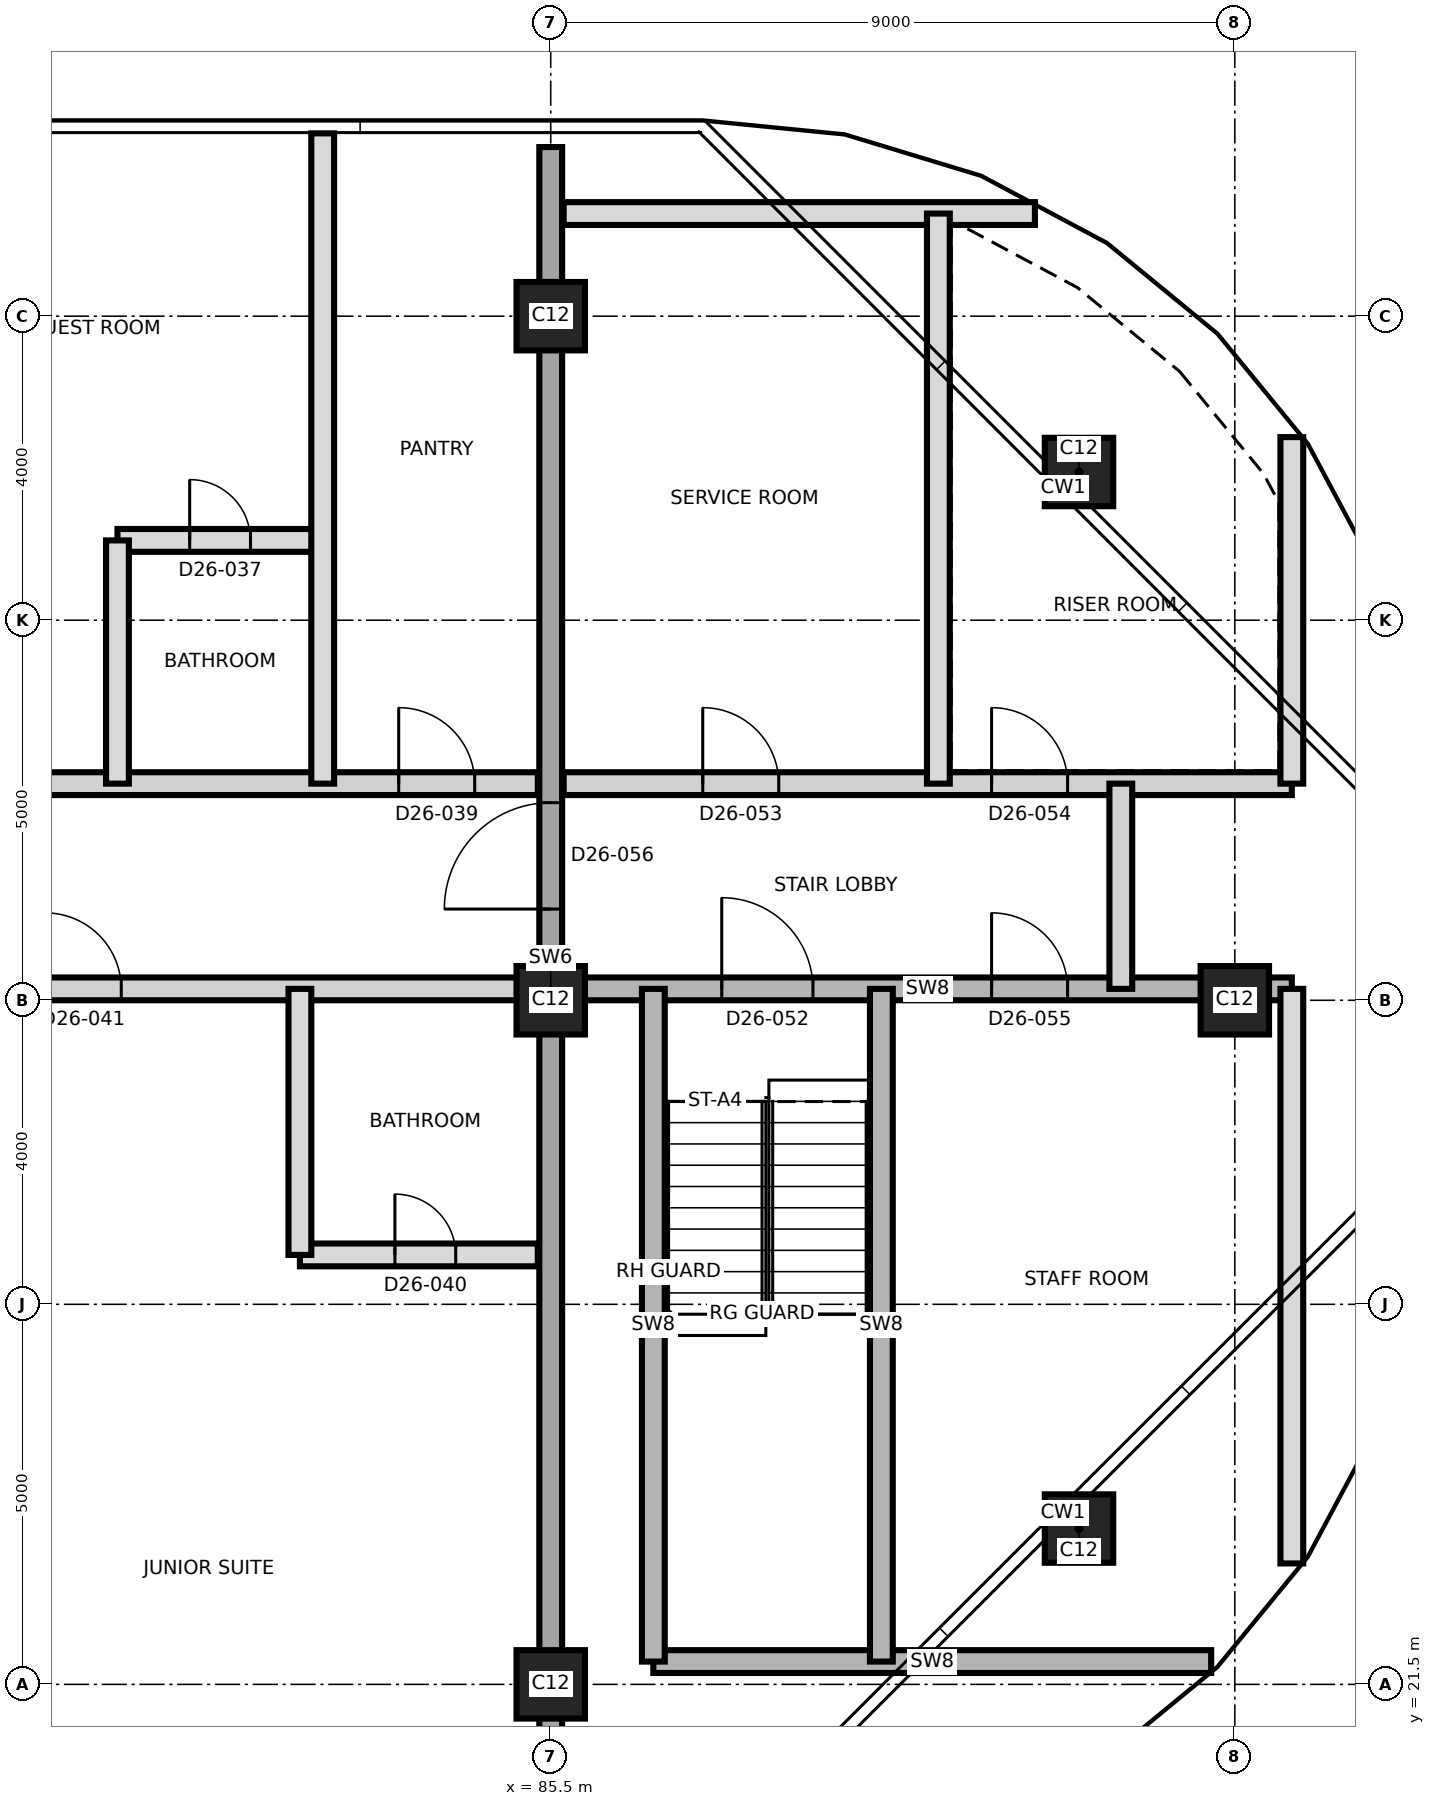
"""IFC4 building model, lengths in metres.
Left out: names, types, materials, properties, quantities, classifications, styles, units other than length and angle.
Written with IfcOpenShell. Run it as: python <this file> out.ifc"""

import sys

from ifc_helpers import new_model, si_unit, direction, frame, frame_2d, origin, origin_2d, place, context, subcontext, project, spatial, rectangle, extrude, element, fill, save


model = new_model("IFC4")
c1 = context("Model", 3, precision=1e-05, world=origin(), true_north=direction((0.0, 1.0)))
c2 = subcontext(c1, "Body", "Model", "MODEL_VIEW")
j1 = project(units=[si_unit("LENGTHUNIT", "METRE"), si_unit("PLANEANGLEUNIT", "RADIAN")], contexts=[c1])
p1 = place(None, origin())
s1 = spatial("IfcSite", under=j1, at=p1, CompositionType="ELEMENT")
p2 = place(p1, origin())
s2 = spatial("IfcBuilding", under=s1, at=p2, CompositionType="ELEMENT")
p3 = place(p2, frame((0.0, 0.0, 240.2)))
s3 = spatial("IfcBuildingStorey", under=s2, at=p3, CompositionType="ELEMENT", Elevation=240.2)
for number, where, z_axis, x_axis in (
    (1, (85.5, 21.5, 0.0), (0.0, 0.0, 1.0), (1.0, 0.0, 0.0)),
    (2, (92.45, 23.55, 0.0), (0.0, 0.0, 1.0), (1.0, 0.0, 0.0)),
    (3, (85.5, 30.5, 0.0), (0.0, 0.0, 1.0), (1.0, 0.0, 0.0)),
    (4, (94.5, 30.5, 0.0), (0.0, 0.0, 1.0), (1.0, 0.0, 0.0)),
    (5, (92.45, 37.45, 0.0), (0.0, 0.0, 1.0), (1.0, 0.0, 0.0)),
    (6, (85.5, 39.5, 0.0), (0.0, 0.0, 1.0), (1.0, 0.0, 0.0)),
):
    element("IfcColumn", number, at=place(p3, frame(where, z_axis=z_axis, x_axis=x_axis)), inside=s3, PredefinedType="COLUMN", context=c2, shape_type="SweptSolid", body=[
        extrude(rectangle(XDim=0.9, YDim=0.9, at=origin_2d()), origin(), (0.0, 0.0, 1.0), 3.7),
    ])
p4 = place(p3, frame((85.5, 19.275, 0.0), z_axis=(0.0, 0.0, 1.0), x_axis=(0.0, 1.0, 0.0)))
e7 = element("IfcWall", 7, at=p4, inside=s3, PredefinedType="SHEAR", context=c2, shape_type="SweptSolid", body=[
    extrude(rectangle(XDim=22.45, YDim=0.3, at=frame_2d((11.225, 0.0))), origin(), (0.0, 0.0, 1.0), 3.7),
])
p5 = place(p4, frame((12.425, 0.0, 0.0)))
e8 = element("IfcOpeningElement", 8, at=p5, cuts=e7, PredefinedType="OPENING", context=c2, shape_type="SweptSolid", body=[
    extrude(rectangle(XDim=1.4, YDim=2.1, at=frame_2d((0.7, 1.05))), frame((0.0, 0.16, 0.0), z_axis=(0.0, -1.0, 0.0), x_axis=(1.0, 0.0, 0.0)), (0.0, 0.0, 1.0), 0.32),
])
p6 = place(p3, frame((86.85, 21.8, 0.0), z_axis=(0.0, 0.0, 1.0), x_axis=(1.0, 0.0, 0.0)))
e9 = element("IfcWall", 9, at=p6, inside=s3, PredefinedType="SHEAR", context=c2, shape_type="SweptSolid", body=[
    extrude(rectangle(XDim=7.339, YDim=0.3, at=frame_2d((3.669, 0.0))), origin(), (0.0, 0.0, 1.0), 3.4),
])
p7 = place(p3, frame((82.2, 27.15, 0.0), z_axis=(0.0, 0.0, 1.0), x_axis=(1.0, 0.0, 0.0)))
e10 = element("IfcWall", 10, at=p7, inside=s3, PredefinedType="PARTITIONING", context=c2, shape_type="SweptSolid", body=[
    extrude(rectangle(XDim=3.13, YDim=0.3, at=frame_2d((1.565, 0.0))), origin(), (0.0, 0.0, 1.0), 3.4),
])
p8 = place(p7, frame((1.25, 0.0, 0.0)))
e11 = element("IfcOpeningElement", 11, at=p8, cuts=e10, PredefinedType="OPENING", context=c2, shape_type="SweptSolid", body=[
    extrude(rectangle(XDim=0.8, YDim=2.1, at=frame_2d((0.4, 1.05))), frame((0.0, 0.16, 0.0), z_axis=(0.0, -1.0, 0.0), x_axis=(1.0, 0.0, 0.0)), (0.0, 0.0, 1.0), 0.32),
])
p9 = place(p3, frame((58.55, 30.65, 0.0), z_axis=(0.0, 0.0, 1.0), x_axis=(1.0, 0.0, 0.0)))
e12 = element("IfcWall", 12, at=p9, inside=s3, PredefinedType="PARTITIONING", context=c2, shape_type="SweptSolid", body=[
    extrude(rectangle(XDim=26.78, YDim=0.3, at=frame_2d((13.39, 0.0))), origin(), (0.0, 0.0, 1.0), 3.4),
])
p10 = place(p9, frame((1.085, 0.0, 0.0)))
e13 = element("IfcOpeningElement", 13, at=p10, cuts=e12, PredefinedType="OPENING", context=c2, shape_type="SweptSolid", body=[
    extrude(rectangle(XDim=1.2, YDim=2.1, at=frame_2d((0.6, 1.05))), frame((0.0, 0.16, 0.0), z_axis=(0.0, -1.0, 0.0), x_axis=(1.0, 0.0, 0.0)), (0.0, 0.0, 1.0), 0.32),
])
p11 = place(p9, frame((4.335, 0.0, 0.0)))
e14 = element("IfcOpeningElement", 14, at=p11, cuts=e12, PredefinedType="OPENING", context=c2, shape_type="SweptSolid", body=[
    extrude(rectangle(XDim=1.0, YDim=2.1, at=frame_2d((0.5, 1.05))), frame((0.0, 0.16, 0.0), z_axis=(0.0, -1.0, 0.0), x_axis=(1.0, 0.0, 0.0)), (0.0, 0.0, 1.0), 0.32),
])
p12 = place(p9, frame((14.6, 0.0, 0.0)))
e15 = element("IfcOpeningElement", 15, at=p12, cuts=e12, PredefinedType="OPENING", context=c2, shape_type="SweptSolid", body=[
    extrude(rectangle(XDim=1.0, YDim=2.4, at=frame_2d((0.5, 1.2))), frame((0.0, 0.16, 0.0), z_axis=(0.0, -1.0, 0.0), x_axis=(1.0, 0.0, 0.0)), (0.0, 0.0, 1.0), 0.32),
])
p13 = place(p9, frame((20.3, 0.0, 0.0)))
e16 = element("IfcOpeningElement", 16, at=p13, cuts=e12, PredefinedType="OPENING", context=c2, shape_type="SweptSolid", body=[
    extrude(rectangle(XDim=1.0, YDim=2.4, at=frame_2d((0.5, 1.2))), frame((0.0, 0.16, 0.0), z_axis=(0.0, -1.0, 0.0), x_axis=(1.0, 0.0, 0.0)), (0.0, 0.0, 1.0), 0.32),
])
p14 = place(p3, frame((85.67, 30.65, 0.0), z_axis=(0.0, 0.0, 1.0), x_axis=(1.0, 0.0, 0.0)))
e17 = element("IfcWall", 17, at=p14, inside=s3, PredefinedType="SHEAR", context=c2, shape_type="SweptSolid", body=[
    extrude(rectangle(XDim=9.58, YDim=0.3, at=frame_2d((4.79, 0.0))), origin(), (0.0, 0.0, 1.0), 3.4),
])
p15 = place(p14, frame((2.08, 0.0, 0.0)))
e18 = element("IfcOpeningElement", 18, at=p15, cuts=e17, PredefinedType="OPENING", context=c2, shape_type="SweptSolid", body=[
    extrude(rectangle(XDim=1.2, YDim=2.1, at=frame_2d((0.6, 1.05))), frame((0.0, 0.16, 0.0), z_axis=(0.0, -1.0, 0.0), x_axis=(1.0, 0.0, 0.0)), (0.0, 0.0, 1.0), 0.32),
])
p16 = place(p14, frame((5.63, 0.0, 0.0)))
e19 = element("IfcOpeningElement", 19, at=p16, cuts=e17, PredefinedType="OPENING", context=c2, shape_type="SweptSolid", body=[
    extrude(rectangle(XDim=1.0, YDim=2.1, at=frame_2d((0.5, 1.05))), frame((0.0, 0.16, 0.0), z_axis=(0.0, -1.0, 0.0), x_axis=(1.0, 0.0, 0.0)), (0.0, 0.0, 1.0), 0.32),
])
p17 = place(p3, frame((58.55, 33.35, 0.0), z_axis=(0.0, 0.0, 1.0), x_axis=(1.0, 0.0, 0.0)))
e20 = element("IfcWall", 20, at=p17, inside=s3, PredefinedType="PARTITIONING", context=c2, shape_type="SweptSolid", body=[
    extrude(rectangle(XDim=26.78, YDim=0.3, at=frame_2d((13.39, 0.0))), origin(), (0.0, 0.0, 1.0), 3.4),
])
p18 = place(p17, frame((3.95, 0.0, 0.0)))
e21 = element("IfcOpeningElement", 21, at=p18, cuts=e20, PredefinedType="OPENING", context=c2, shape_type="SweptSolid", body=[
    extrude(rectangle(XDim=1.0, YDim=2.4, at=frame_2d((0.5, 1.2))), frame((0.0, 0.16, 0.0), z_axis=(0.0, -1.0, 0.0), x_axis=(1.0, 0.0, 0.0)), (0.0, 0.0, 1.0), 0.32),
])
p19 = place(p17, frame((12.365, 0.0, 0.0)))
e22 = element("IfcOpeningElement", 22, at=p19, cuts=e20, PredefinedType="OPENING", context=c2, shape_type="SweptSolid", body=[
    extrude(rectangle(XDim=1.0, YDim=2.1, at=frame_2d((0.5, 1.05))), frame((0.0, 0.16, 0.0), z_axis=(0.0, -1.0, 0.0), x_axis=(1.0, 0.0, 0.0)), (0.0, 0.0, 1.0), 0.32),
])
p20 = place(p17, frame((15.315, 0.0, 0.0)))
e23 = element("IfcOpeningElement", 23, at=p20, cuts=e20, PredefinedType="OPENING", context=c2, shape_type="SweptSolid", body=[
    extrude(rectangle(XDim=1.4, YDim=2.1, at=frame_2d((0.7, 1.05))), frame((0.0, 0.16, 0.0), z_axis=(0.0, -1.0, 0.0), x_axis=(1.0, 0.0, 0.0)), (0.0, 0.0, 1.0), 0.32),
])
p21 = place(p17, frame((19.1, 0.0, 0.0)))
e24 = element("IfcOpeningElement", 24, at=p21, cuts=e20, PredefinedType="OPENING", context=c2, shape_type="SweptSolid", body=[
    extrude(rectangle(XDim=1.0, YDim=2.1, at=frame_2d((0.5, 1.05))), frame((0.0, 0.16, 0.0), z_axis=(0.0, -1.0, 0.0), x_axis=(1.0, 0.0, 0.0)), (0.0, 0.0, 1.0), 0.32),
])
p22 = place(p17, frame((24.95, 0.0, 0.0)))
e25 = element("IfcOpeningElement", 25, at=p22, cuts=e20, PredefinedType="OPENING", context=c2, shape_type="SweptSolid", body=[
    extrude(rectangle(XDim=1.0, YDim=2.1, at=frame_2d((0.5, 1.05))), frame((0.0, 0.16, 0.0), z_axis=(0.0, -1.0, 0.0), x_axis=(1.0, 0.0, 0.0)), (0.0, 0.0, 1.0), 0.32),
])
p23 = place(p3, frame((85.67, 33.35, 0.0), z_axis=(0.0, 0.0, 1.0), x_axis=(1.0, 0.0, 0.0)))
e26 = element("IfcWall", 26, at=p23, inside=s3, PredefinedType="PARTITIONING", context=c2, shape_type="SweptSolid", body=[
    extrude(rectangle(XDim=9.58, YDim=0.3, at=frame_2d((4.79, 0.0))), origin(), (0.0, 0.0, 1.0), 3.4),
])
p24 = place(p23, frame((1.83, 0.0, 0.0)))
e27 = element("IfcOpeningElement", 27, at=p24, cuts=e26, PredefinedType="OPENING", context=c2, shape_type="SweptSolid", body=[
    extrude(rectangle(XDim=1.0, YDim=2.1, at=frame_2d((0.5, 1.05))), frame((0.0, 0.16, 0.0), z_axis=(0.0, -1.0, 0.0), x_axis=(1.0, 0.0, 0.0)), (0.0, 0.0, 1.0), 0.32),
])
p25 = place(p23, frame((5.63, 0.0, 0.0)))
e28 = element("IfcOpeningElement", 28, at=p25, cuts=e26, PredefinedType="OPENING", context=c2, shape_type="SweptSolid", body=[
    extrude(rectangle(XDim=1.0, YDim=2.1, at=frame_2d((0.5, 1.05))), frame((0.0, 0.16, 0.0), z_axis=(0.0, -1.0, 0.0), x_axis=(1.0, 0.0, 0.0)), (0.0, 0.0, 1.0), 0.32),
])
p26 = place(p3, frame((79.8, 36.55, 0.0), z_axis=(0.0, 0.0, 1.0), x_axis=(1.0, 0.0, 0.0)))
e29 = element("IfcWall", 29, at=p26, inside=s3, PredefinedType="PARTITIONING", context=c2, shape_type="SweptSolid", body=[
    extrude(rectangle(XDim=2.7, YDim=0.3, at=frame_2d((1.35, 0.0))), origin(), (0.0, 0.0, 1.0), 3.4),
])
p27 = place(p26, frame((0.95, 0.0, 0.0)))
e30 = element("IfcOpeningElement", 30, at=p27, cuts=e29, PredefinedType="OPENING", context=c2, shape_type="SweptSolid", body=[
    extrude(rectangle(XDim=0.8, YDim=2.1, at=frame_2d((0.4, 1.05))), frame((0.0, 0.16, 0.0), z_axis=(0.0, -1.0, 0.0), x_axis=(1.0, 0.0, 0.0)), (0.0, 0.0, 1.0), 0.32),
])
p28 = place(p3, frame((85.67, 40.85, 0.0), z_axis=(0.0, 0.0, 1.0), x_axis=(1.0, 0.0, 0.0)))
e31 = element("IfcWall", 31, at=p28, inside=s3, PredefinedType="PARTITIONING", context=c2, shape_type="SweptSolid", body=[
    extrude(rectangle(XDim=6.2, YDim=0.3, at=frame_2d((3.1, 0.0))), origin(), (0.0, 0.0, 1.0), 3.35),
])
p29 = place(p3, frame((79.8, 33.35, 0.0), z_axis=(0.0, 0.0, 1.0), x_axis=(0.0, 1.0, 0.0)))
e32 = element("IfcWall", 32, at=p29, inside=s3, PredefinedType="PARTITIONING", context=c2, shape_type="SweptSolid", body=[
    extrude(rectangle(XDim=3.2, YDim=0.3, at=frame_2d((1.6, 0.0))), origin(), (0.0, 0.0, 1.0), 3.4),
])
p30 = place(p3, frame((82.2, 27.15, 0.0), z_axis=(0.0, 0.0, 1.0), x_axis=(0.0, 1.0, 0.0)))
e33 = element("IfcWall", 33, at=p30, inside=s3, PredefinedType="PARTITIONING", context=c2, shape_type="SweptSolid", body=[
    extrude(rectangle(XDim=3.5, YDim=0.3, at=frame_2d((1.75, 0.0))), origin(), (0.0, 0.0, 1.0), 3.4),
])
p31 = place(p3, frame((82.5, 33.35, 0.0), z_axis=(0.0, 0.0, 1.0), x_axis=(0.0, 1.0, 0.0)))
e34 = element("IfcWall", 34, at=p31, inside=s3, PredefinedType="PARTITIONING", context=c2, shape_type="SweptSolid", body=[
    extrude(rectangle(XDim=8.555, YDim=0.3, at=frame_2d((4.277, 0.0))), origin(), (0.0, 0.0, 1.0), 3.35),
])
for number, where, z_axis, x_axis in (
    (35, (86.85, 21.8, 0.0), (0.0, 0.0, 1.0), (0.0, 1.0, 0.0)),
    (36, (89.85, 21.8, 0.0), (0.0, 0.0, 1.0), (0.0, 1.0, 0.0)),
):
    element("IfcWall", number, at=place(p3, frame(where, z_axis=z_axis, x_axis=x_axis)), inside=s3, PredefinedType="SHEAR", context=c2, shape_type="SweptSolid", body=[
        extrude(rectangle(XDim=8.85, YDim=0.3, at=frame_2d((4.425, 0.0))), origin(), (0.0, 0.0, 1.0), 3.4),
    ])
p32 = place(p3, frame((90.6, 33.35, 0.0), z_axis=(0.0, 0.0, 1.0), x_axis=(0.0, 1.0, 0.0)))
e37 = element("IfcWall", 37, at=p32, inside=s3, PredefinedType="PARTITIONING", context=c2, shape_type="SweptSolid", body=[
    extrude(rectangle(XDim=7.5, YDim=0.3, at=frame_2d((3.75, 0.0))), origin(), (0.0, 0.0, 1.0), 3.35),
])
p33 = place(p3, frame((93.0, 30.65, 0.0), z_axis=(0.0, 0.0, 1.0), x_axis=(0.0, 1.0, 0.0)))
e38 = element("IfcWall", 38, at=p33, inside=s3, PredefinedType="PARTITIONING", context=c2, shape_type="SweptSolid", body=[
    extrude(rectangle(XDim=2.7, YDim=0.3, at=frame_2d((1.35, 0.0))), origin(), (0.0, 0.0, 1.0), 3.4),
])
p34 = place(p3, frame((95.25, 23.091, 0.0), z_axis=(0.0, 0.0, 1.0), x_axis=(0.0, 1.0, 0.0)))
e39 = element("IfcWall", 39, at=p34, inside=s3, PredefinedType="PARTITIONING", context=c2, shape_type="SweptSolid", body=[
    extrude(rectangle(XDim=7.559, YDim=0.3, at=frame_2d((3.779, 0.0))), origin(), (0.0, 0.0, 1.0), 3.35),
])
p35 = place(p3, frame((95.25, 33.35, 0.0), z_axis=(0.0, 0.0, 1.0), x_axis=(0.0, 1.0, 0.0)))
e40 = element("IfcWall", 40, at=p35, inside=s3, PredefinedType="PARTITIONING", context=c2, shape_type="SweptSolid", body=[
    extrude(rectangle(XDim=4.559, YDim=0.3, at=frame_2d((2.279, 0.0))), origin(), (0.0, 0.0, 1.0), 3.35),
])
p36 = place(p27, origin())
e41 = element("IfcDoor", 41, at=p36, inside=s3, OperationType="SINGLE_SWING_LEFT", PredefinedType="DOOR", context=c2, shape_type="SweptSolid", body=[
    extrude(rectangle(XDim=0.8, YDim=2.1, at=frame_2d((0.4, 1.05))), frame((0.0, 0.025, 0.0), z_axis=(0.0, -1.0, 0.0), x_axis=(1.0, 0.0, 0.0)), (0.0, 0.0, 1.0), 0.05),
])
fill(e30, e41)
p37 = place(p22, origin())
e42 = element("IfcDoor", 42, at=p37, inside=s3, OperationType="SINGLE_SWING_LEFT", PredefinedType="DOOR", context=c2, shape_type="SweptSolid", body=[
    extrude(rectangle(XDim=1.0, YDim=2.1, at=frame_2d((0.5, 1.05))), frame((0.0, 0.025, 0.0), z_axis=(0.0, -1.0, 0.0), x_axis=(1.0, 0.0, 0.0)), (0.0, 0.0, 1.0), 0.05),
])
fill(e25, e42)
p38 = place(p8, origin())
e43 = element("IfcDoor", 43, at=p38, inside=s3, OperationType="SINGLE_SWING_LEFT", PredefinedType="DOOR", context=c2, shape_type="SweptSolid", body=[
    extrude(rectangle(XDim=0.8, YDim=2.1, at=frame_2d((0.4, 1.05))), frame((0.0, 0.025, 0.0), z_axis=(0.0, -1.0, 0.0), x_axis=(1.0, 0.0, 0.0)), (0.0, 0.0, 1.0), 0.05),
])
fill(e11, e43)
p39 = place(p13, origin())
e44 = element("IfcDoor", 44, at=p39, inside=s3, OperationType="SINGLE_SWING_RIGHT", PredefinedType="DOOR", context=c2, shape_type="SweptSolid", body=[
    extrude(rectangle(XDim=1.0, YDim=2.4, at=frame_2d((0.5, 1.2))), frame((0.0, 0.025, 0.0), z_axis=(0.0, -1.0, 0.0), x_axis=(1.0, 0.0, 0.0)), (0.0, 0.0, 1.0), 0.05),
])
fill(e16, e44)
p40 = place(p15, origin())
e45 = element("IfcDoor", 45, at=p40, inside=s3, OperationType="SINGLE_SWING_LEFT", PredefinedType="DOOR", context=c2, shape_type="SweptSolid", body=[
    extrude(rectangle(XDim=1.2, YDim=2.1, at=frame_2d((0.6, 1.05))), frame((0.0, 0.025, 0.0), z_axis=(0.0, -1.0, 0.0), x_axis=(1.0, 0.0, 0.0)), (0.0, 0.0, 1.0), 0.05),
])
fill(e18, e45)
p41 = place(p24, origin())
e46 = element("IfcDoor", 46, at=p41, inside=s3, OperationType="SINGLE_SWING_LEFT", PredefinedType="DOOR", context=c2, shape_type="SweptSolid", body=[
    extrude(rectangle(XDim=1.0, YDim=2.1, at=frame_2d((0.5, 1.05))), frame((0.0, 0.025, 0.0), z_axis=(0.0, -1.0, 0.0), x_axis=(1.0, 0.0, 0.0)), (0.0, 0.0, 1.0), 0.05),
])
fill(e27, e46)
p42 = place(p25, origin())
e47 = element("IfcDoor", 47, at=p42, inside=s3, OperationType="SINGLE_SWING_RIGHT", PredefinedType="DOOR", context=c2, shape_type="SweptSolid", body=[
    extrude(rectangle(XDim=1.0, YDim=2.1, at=frame_2d((0.5, 1.05))), frame((0.0, 0.025, 0.0), z_axis=(0.0, -1.0, 0.0), x_axis=(1.0, 0.0, 0.0)), (0.0, 0.0, 1.0), 0.05),
])
fill(e28, e47)
p43 = place(p16, origin())
e48 = element("IfcDoor", 48, at=p43, inside=s3, OperationType="SINGLE_SWING_LEFT", PredefinedType="DOOR", context=c2, shape_type="SweptSolid", body=[
    extrude(rectangle(XDim=1.0, YDim=2.1, at=frame_2d((0.5, 1.05))), frame((0.0, 0.025, 0.0), z_axis=(0.0, -1.0, 0.0), x_axis=(1.0, 0.0, 0.0)), (0.0, 0.0, 1.0), 0.05),
])
fill(e19, e48)
p44 = place(p5, origin())
e49 = element("IfcDoor", 49, at=p44, inside=s3, OperationType="SINGLE_SWING_RIGHT", PredefinedType="DOOR", context=c2, shape_type="SweptSolid", body=[
    extrude(rectangle(XDim=1.4, YDim=2.1, at=frame_2d((0.7, 1.05))), frame((0.0, 0.025, 0.0), z_axis=(0.0, -1.0, 0.0), x_axis=(1.0, 0.0, 0.0)), (0.0, 0.0, 1.0), 0.05),
])
fill(e8, e49)
save(model, sys.argv[1])
